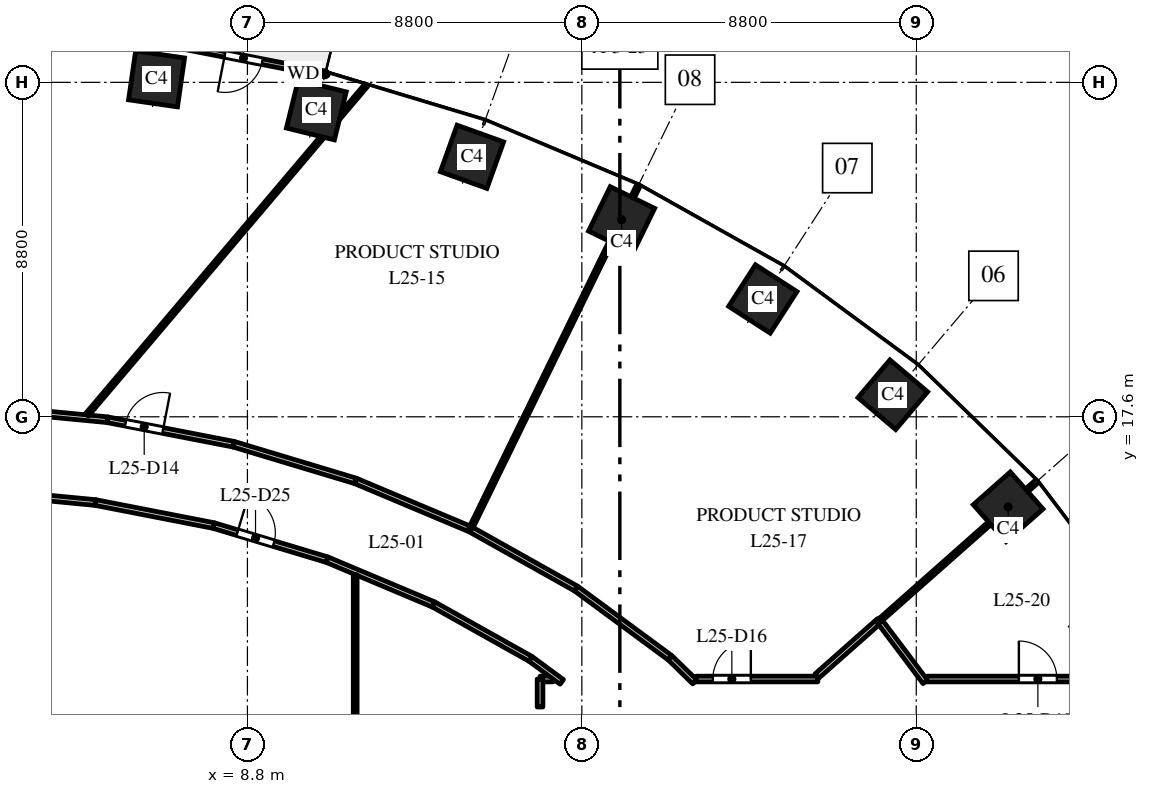
"""IFC4 building model, lengths in metres.
Left out: names, types, materials, properties, quantities, classifications, styles, units other than length and angle.
Written with IfcOpenShell. Run it as: python <this file> out.ifc"""

import sys

from ifc_helpers import new_model, si_unit, direction, frame, frame_2d, origin, origin_2d, place, context, subcontext, project, spatial, rectangle, extrude, element, fill, save


model = new_model("IFC4")
c1 = context("Model", 3, precision=1e-05, world=origin(), true_north=direction((0.0, 1.0)))
c2 = subcontext(c1, "Body", "Model", "MODEL_VIEW")
j1 = project(units=[si_unit("LENGTHUNIT", "METRE"), si_unit("PLANEANGLEUNIT", "RADIAN")], contexts=[c1])
p1 = place(None, origin())
s1 = spatial("IfcSite", under=j1, at=p1, CompositionType="ELEMENT")
p2 = place(p1, origin())
s2 = spatial("IfcBuilding", under=s1, at=p2, CompositionType="ELEMENT")
p3 = place(p2, frame((0.0, 0.0, 112.0)))
s3 = spatial("IfcBuildingStorey", under=s2, at=p3, CompositionType="ELEMENT", Elevation=112.0)
for number, where, z_axis, x_axis in (
    (1, (28.819, 15.23, 0.0), (0.0, 0.0, 1.0), (-0.663, 0.749, 0.0)),
    (2, (25.783, 18.18, 0.0), (0.0, 0.0, 1.0), (-0.763, 0.646, 0.0)),
    (3, (22.362, 20.7, 0.0), (0.0, 0.0, 1.0), (-0.84, 0.542, 0.0)),
    (4, (18.646, 22.785, 0.0), (0.0, 0.0, 1.0), (-0.898, 0.439, 0.0)),
    (5, (14.709, 24.441, 0.0), (0.0, 0.0, 1.0), (-0.941, 0.338, 0.0)),
    (6, (10.613, 25.674, 0.0), (0.0, 0.0, 1.0), (-0.971, 0.24, 0.0)),
    (7, (6.409, 26.491, 0.0), (0.0, 0.0, 1.0), (-0.99, 0.143, 0.0)),
):
    element("IfcColumn", number, at=place(p3, frame(where, z_axis=z_axis, x_axis=x_axis)), inside=s3, PredefinedType="COLUMN", context=c2, shape_type="SweptSolid", body=[
        extrude(rectangle(XDim=1.3, YDim=1.3, at=origin_2d()), origin(), (0.0, 0.0, 1.0), 4.0),
    ])
p4 = place(p3, frame((10.871, 26.617, 0.0), z_axis=(0.0, 0.0, 1.0), x_axis=(-0.981631174778, 0.190788460615, 0.0)))
e8 = element("IfcWall", 8, at=p4, inside=s3, PredefinedType="STANDARD", context=c2, shape_type="SweptSolid", body=[
    extrude(rectangle(XDim=4.426, YDim=0.15, at=frame_2d((2.213, 0.0))), origin(), (0.0, 0.0, 1.0), 3.7),
])
p5 = place(p4, frame((1.713, 0.0, 0.0)))
e9 = element("IfcOpeningElement", 9, at=p5, cuts=e8, PredefinedType="OPENING", context=c2, shape_type="SweptSolid", body=[
    extrude(rectangle(XDim=1.0, YDim=2.4, at=frame_2d((0.5, 1.2))), frame((0.0, 0.085, 0.0), z_axis=(0.0, -1.0, 0.0), x_axis=(1.0, 0.0, 0.0)), (0.0, 0.0, 1.0), 0.17),
])
p6 = place(p3, frame((1.608, 15.648, 0.0), z_axis=(0.0, 0.0, 1.0), x_axis=(0.995491705426, -0.09484863957, 0.0)))
e10 = element("IfcWall", 10, at=p6, inside=s3, PredefinedType="PARTITIONING", context=c2, shape_type="SweptSolid", body=[
    extrude(rectangle(XDim=3.205, YDim=0.15, at=frame_2d((1.602, 0.0))), origin(), (0.0, 0.0, 1.0), 2.85),
])
p7 = place(p3, frame((1.712, 17.848, 0.0), z_axis=(0.0, 0.0, 1.0), x_axis=(0.995466844572, -0.095109207532, 0.0)))
e11 = element("IfcWall", 11, at=p7, inside=s3, PredefinedType="PARTITIONING", context=c2, shape_type="SweptSolid", body=[
    extrude(rectangle(XDim=3.417, YDim=0.15, at=frame_2d((1.708, 0.0))), origin(), (0.0, 0.0, 1.0), 2.85),
])
p8 = place(p3, frame((4.576, 17.651, 0.0), z_axis=(0.0, 0.0, 1.0), x_axis=(0.646514915662, 0.762901346064, 0.0)))
e12 = element("IfcWall", 12, at=p8, inside=s3, PredefinedType="PARTITIONING", context=c2, shape_type="SweptSolid", body=[
    extrude(rectangle(XDim=11.367, YDim=0.1, at=frame_2d((5.684, 0.0))), origin(), (0.0, 0.0, 1.0), 2.9),
])
p9 = place(p3, frame((4.798, 15.344, 0.0), z_axis=(0.0, 0.0, 1.0), x_axis=(0.981588545092, -0.191007665145, 0.0)))
e13 = element("IfcWall", 13, at=p9, inside=s3, PredefinedType="PARTITIONING", context=c2, shape_type="SweptSolid", body=[
    extrude(rectangle(XDim=3.172, YDim=0.15, at=frame_2d((1.586, 0.0))), origin(), (0.0, 0.0, 1.0), 3.7),
])
p10 = place(p3, frame((5.113, 17.523, 0.0), z_axis=(0.0, 0.0, 1.0), x_axis=(0.981665220565, -0.190613207134, 0.0)))
e14 = element("IfcWall", 14, at=p10, inside=s3, PredefinedType="PARTITIONING", context=c2, shape_type="SweptSolid", body=[
    extrude(rectangle(XDim=3.389, YDim=0.15, at=frame_2d((1.695, 0.0))), origin(), (0.0, 0.0, 1.0), 3.7),
])
p11 = place(p10, frame((0.489, 0.0, 0.0)))
e15 = element("IfcOpeningElement", 15, at=p11, cuts=e14, PredefinedType="OPENING", context=c2, shape_type="SweptSolid", body=[
    extrude(rectangle(XDim=1.0, YDim=2.1, at=frame_2d((0.5, 1.05))), frame((0.0, 0.085, 0.0), z_axis=(0.0, -1.0, 0.0), x_axis=(1.0, 0.0, 0.0)), (0.0, 0.0, 1.0), 0.17),
])
p12 = place(p3, frame((7.912, 14.738, 0.0), z_axis=(0.0, 0.0, 1.0), x_axis=(0.957606118849, -0.28808075455, 0.0)))
e16 = element("IfcWall", 16, at=p12, inside=s3, PredefinedType="PARTITIONING", context=c2, shape_type="SweptSolid", body=[
    extrude(rectangle(XDim=3.117, YDim=0.15, at=frame_2d((1.559, 0.0))), origin(), (0.0, 0.0, 1.0), 2.85),
])
p13 = place(p12, frame((0.65, 0.0, 0.0)))
e17 = element("IfcOpeningElement", 17, at=p13, cuts=e16, PredefinedType="OPENING", context=c2, shape_type="SweptSolid", body=[
    extrude(rectangle(XDim=1.0, YDim=2.1, at=frame_2d((0.5, 1.05))), frame((0.0, 0.085, 0.0), z_axis=(0.0, -1.0, 0.0), x_axis=(1.0, 0.0, 0.0)), (0.0, 0.0, 1.0), 0.17),
])
p14 = place(p3, frame((8.44, 16.877, 0.0), z_axis=(0.0, 0.0, 1.0), x_axis=(0.957584891346, -0.288151307243, 0.0)))
e18 = element("IfcWall", 18, at=p14, inside=s3, PredefinedType="PARTITIONING", context=c2, shape_type="SweptSolid", body=[
    extrude(rectangle(XDim=3.345, YDim=0.15, at=frame_2d((1.672, 0.0))), origin(), (0.0, 0.0, 1.0), 2.85),
])
p15 = place(p3, frame((10.897, 13.84, 0.0), z_axis=(0.0, 0.0, 1.0), x_axis=(0.921751821358, -0.387780324183, 0.0)))
e19 = element("IfcWall", 19, at=p15, inside=s3, PredefinedType="PARTITIONING", context=c2, shape_type="SweptSolid", body=[
    extrude(rectangle(XDim=3.038, YDim=0.15, at=frame_2d((1.519, 0.0))), origin(), (0.0, 0.0, 1.0), 3.7),
])
p16 = place(p3, frame((11.636, -13.444, 0.0), z_axis=(0.0, 0.0, 1.0), x_axis=(0.0, 1.0, 0.0)))
e20 = element("IfcWall", 20, at=p16, inside=s3, PredefinedType="PARTITIONING", context=c2, shape_type="SweptSolid", body=[
    extrude(rectangle(XDim=26.888, YDim=0.1, at=frame_2d((13.444, 0.0))), origin(), (0.0, 0.0, 1.0), 2.75),
])
p17 = place(p3, frame((11.643, 15.913, 0.0), z_axis=(0.0, 0.0, 1.0), x_axis=(0.921789499058, -0.38769075231, 0.0)))
e21 = element("IfcWall", 21, at=p17, inside=s3, PredefinedType="PARTITIONING", context=c2, shape_type="SweptSolid", body=[
    extrude(rectangle(XDim=3.278, YDim=0.15, at=frame_2d((1.639, 0.0))), origin(), (0.0, 0.0, 1.0), 3.7),
])
p18 = place(p3, frame((13.697, 12.662, 0.0), z_axis=(0.0, 0.0, 1.0), x_axis=(0.872147381065, -0.489243237767, 0.0)))
e22 = element("IfcWall", 22, at=p18, inside=s3, PredefinedType="PARTITIONING", context=c2, shape_type="SweptSolid", body=[
    extrude(rectangle(XDim=2.927, YDim=0.15, at=frame_2d((1.464, 0.0))), origin(), (0.0, 0.0, 1.0), 3.7),
])
p19 = place(p3, frame((14.667, 14.646, 0.0), z_axis=(0.0, 0.0, 1.0), x_axis=(0.439197946233, 0.898390318305, 0.0)))
e23 = element("IfcWall", 23, at=p19, inside=s3, PredefinedType="PARTITIONING", context=c2, shape_type="SweptSolid", body=[
    extrude(rectangle(XDim=10.061, YDim=0.1, at=frame_2d((5.031, 0.0))), origin(), (0.0, 0.0, 1.0), 2.9),
])
p20 = place(p3, frame((14.682, 14.632, 0.0), z_axis=(0.0, 0.0, 1.0), x_axis=(0.872147050911, -0.489243826315, 0.0)))
e24 = element("IfcWall", 24, at=p20, inside=s3, PredefinedType="PARTITIONING", context=c2, shape_type="SweptSolid", body=[
    extrude(rectangle(XDim=3.168, YDim=0.15, at=frame_2d((1.584, 0.0))), origin(), (0.0, 0.0, 1.0), 3.7),
])
p21 = place(p3, frame((16.25, 11.23, 0.0), z_axis=(0.0, 0.0, 1.0), x_axis=(0.805055837353, -0.59319903805, 0.0)))
e25 = element("IfcWall", 25, at=p21, inside=s3, PredefinedType="PARTITIONING", context=c2, shape_type="SweptSolid", body=[
    extrude(rectangle(XDim=1.02, YDim=0.15, at=frame_2d((0.51, 0.0))), origin(), (0.0, 0.0, 1.0), 3.7),
])
p22 = place(p3, frame((16.5, 9.964, 0.0), z_axis=(0.0, 0.0, 1.0), x_axis=(0.0, 1.0, 0.0)))
e26 = element("IfcWall", 26, at=p22, inside=s3, PredefinedType="PARTITIONING", context=c2, shape_type="SweptSolid", body=[
    extrude(rectangle(XDim=0.736, YDim=0.15, at=frame_2d((0.368, 0.0))), origin(), (0.0, 0.0, 1.0), 3.7),
])
p23 = place(p3, frame((16.5, 10.7, 0.0), z_axis=(0.0, 0.0, 1.0), x_axis=(1.0, 0.0, 0.0)))
e27 = element("IfcWall", 27, at=p23, inside=s3, PredefinedType="PARTITIONING", context=c2, shape_type="SweptSolid", body=[
    extrude(rectangle(XDim=0.343, YDim=0.15, at=frame_2d((0.171, 0.0))), origin(), (0.0, 0.0, 1.0), 3.7),
])
p24 = place(p3, frame((17.445, 13.082, 0.0), z_axis=(0.0, 0.0, 1.0), x_axis=(0.805185638843, -0.593022838516, 0.0)))
e28 = element("IfcWall", 28, at=p24, inside=s3, PredefinedType="PARTITIONING", context=c2, shape_type="SweptSolid", body=[
    extrude(rectangle(XDim=3.073, YDim=0.15, at=frame_2d((1.536, 0.0))), origin(), (0.0, 0.0, 1.0), 3.7),
])
p25 = place(p3, frame((19.919, 11.26, 0.0), z_axis=(0.0, 0.0, 1.0), x_axis=(0.716953986293, -0.697120492841, 0.0)))
e29 = element("IfcWall", 29, at=p25, inside=s3, PredefinedType="PARTITIONING", context=c2, shape_type="SweptSolid", body=[
    extrude(rectangle(XDim=0.911, YDim=0.15, at=frame_2d((0.456, 0.0))), origin(), (0.0, 0.0, 1.0), 2.75),
])
p26 = place(p3, frame((20.603, 10.7, 0.0), z_axis=(0.0, 0.0, 1.0), x_axis=(1.0, 0.0, 0.0)))
e30 = element("IfcWall", 30, at=p26, inside=s3, PredefinedType="PARTITIONING", context=c2, shape_type="SweptSolid", body=[
    extrude(rectangle(XDim=3.207, YDim=0.15, at=frame_2d((1.604, 0.0))), origin(), (0.0, 0.0, 1.0), 3.7),
])
p27 = place(p26, frame((0.444, 0.0, 0.0)))
e31 = element("IfcOpeningElement", 31, at=p27, cuts=e30, PredefinedType="OPENING", context=c2, shape_type="SweptSolid", body=[
    extrude(rectangle(XDim=1.0, YDim=2.1, at=frame_2d((0.5, 1.05))), frame((0.0, 0.085, 0.0), z_axis=(0.0, -1.0, 0.0), x_axis=(1.0, 0.0, 0.0)), (0.0, 0.0, 1.0), 0.17),
])
p28 = place(p3, frame((23.785, 10.778, 0.0), z_axis=(0.0, 0.0, 1.0), x_axis=(0.748911595987, 0.662669918886, 0.0)))
e32 = element("IfcWall", 32, at=p28, inside=s3, PredefinedType="PARTITIONING", context=c2, shape_type="SweptSolid", body=[
    extrude(rectangle(XDim=2.194, YDim=0.15, at=frame_2d((1.097, 0.0))), origin(), (0.0, 0.0, 1.0), 3.7),
])
p29 = place(p3, frame((25.428, 12.232, 0.0), z_axis=(0.0, 0.0, 1.0), x_axis=(0.601513631979, -0.798862535449, 0.0)))
e33 = element("IfcWall", 33, at=p29, inside=s3, PredefinedType="PARTITIONING", context=c2, shape_type="SweptSolid", body=[
    extrude(rectangle(XDim=2.011, YDim=0.15, at=frame_2d((1.006, 0.0))), origin(), (0.0, 0.0, 1.0), 3.7),
])
p30 = place(p3, frame((25.428, 12.232, 0.0), z_axis=(0.0, 0.0, 1.0), x_axis=(0.749015105068, 0.662552920437, 0.0)))
e34 = element("IfcWall", 34, at=p30, inside=s3, PredefinedType="PARTITIONING", context=c2, shape_type="SweptSolid", body=[
    extrude(rectangle(XDim=5.529, YDim=0.1, at=frame_2d((2.764, 0.0))), origin(), (0.0, 0.0, 1.0), 3.7),
])
p31 = place(p3, frame((26.676, 10.7, 0.0), z_axis=(0.0, 0.0, 1.0), x_axis=(1.0, 0.0, 0.0)))
e35 = element("IfcWall", 35, at=p31, inside=s3, PredefinedType="PARTITIONING", context=c2, shape_type="SweptSolid", body=[
    extrude(rectangle(XDim=4.824, YDim=0.15, at=frame_2d((2.412, 0.0))), origin(), (0.0, 0.0, 1.0), 2.9),
])
p32 = place(p31, frame((2.424, 0.0, 0.0)))
e36 = element("IfcOpeningElement", 36, at=p32, cuts=e35, PredefinedType="OPENING", context=c2, shape_type="SweptSolid", body=[
    extrude(rectangle(XDim=1.0, YDim=2.1, at=frame_2d((0.5, 1.05))), frame((0.0, 0.085, 0.0), z_axis=(0.0, -1.0, 0.0), x_axis=(1.0, 0.0, 0.0)), (0.0, 0.0, 1.0), 0.17),
])
p33 = place(p5, origin())
e37 = element("IfcDoor", 37, at=p33, inside=s3, OperationType="SINGLE_SWING_RIGHT", PredefinedType="DOOR", context=c2, shape_type="SweptSolid", body=[
    extrude(rectangle(XDim=1.0, YDim=2.4, at=frame_2d((0.5, 1.2))), frame((0.0, 0.025, 0.0), z_axis=(0.0, -1.0, 0.0), x_axis=(1.0, 0.0, 0.0)), (0.0, 0.0, 1.0), 0.05),
])
fill(e9, e37)
p34 = place(p11, origin())
e38 = element("IfcDoor", 38, at=p34, inside=s3, OperationType="SINGLE_SWING_RIGHT", PredefinedType="DOOR", context=c2, shape_type="SweptSolid", body=[
    extrude(rectangle(XDim=1.0, YDim=2.1, at=frame_2d((0.5, 1.05))), frame((0.0, 0.025, 0.0), z_axis=(0.0, -1.0, 0.0), x_axis=(1.0, 0.0, 0.0)), (0.0, 0.0, 1.0), 0.05),
])
fill(e15, e38)
p35 = place(p27, origin())
e39 = element("IfcDoor", 39, at=p35, inside=s3, OperationType="SINGLE_SWING_RIGHT", PredefinedType="DOOR", context=c2, shape_type="SweptSolid", body=[
    extrude(rectangle(XDim=1.0, YDim=2.1, at=frame_2d((0.5, 1.05))), frame((0.0, 0.025, 0.0), z_axis=(0.0, -1.0, 0.0), x_axis=(1.0, 0.0, 0.0)), (0.0, 0.0, 1.0), 0.05),
])
fill(e31, e39)
p36 = place(p32, origin())
e40 = element("IfcDoor", 40, at=p36, inside=s3, OperationType="SINGLE_SWING_LEFT", PredefinedType="DOOR", context=c2, shape_type="SweptSolid", body=[
    extrude(rectangle(XDim=1.0, YDim=2.1, at=frame_2d((0.5, 1.05))), frame((0.0, 0.025, 0.0), z_axis=(0.0, -1.0, 0.0), x_axis=(1.0, 0.0, 0.0)), (0.0, 0.0, 1.0), 0.05),
])
fill(e36, e40)
p37 = place(p13, origin())
e41 = element("IfcDoor", 41, at=p37, inside=s3, OperationType="SINGLE_SWING_LEFT", PredefinedType="DOOR", context=c2, shape_type="SweptSolid", body=[
    extrude(rectangle(XDim=1.0, YDim=2.1, at=frame_2d((0.5, 1.05))), frame((0.0, 0.025, 0.0), z_axis=(0.0, -1.0, 0.0), x_axis=(1.0, 0.0, 0.0)), (0.0, 0.0, 1.0), 0.05),
])
fill(e17, e41)
save(model, sys.argv[1])
